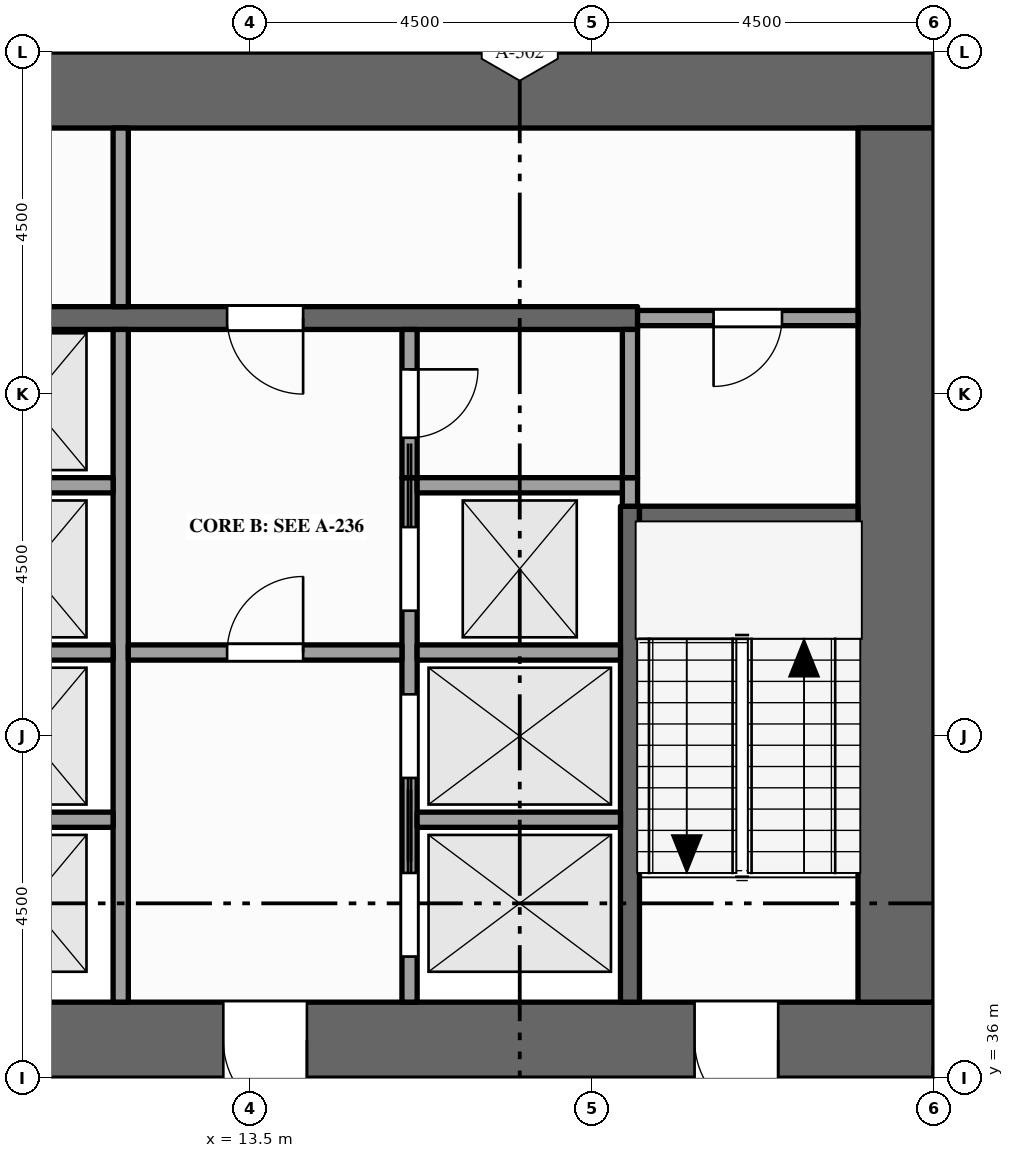
"""IFC4 building model, lengths in metres.
Left out: names, types, materials, properties, quantities, classifications, styles, units other than length and angle.
Written with IfcOpenShell. Run it as: python <this file> out.ifc"""

import sys

from ifc_helpers import new_model, si_unit, direction, frame, frame_2d, origin, place, context, subcontext, project, spatial, rectangle, extrude, element, fill, save


model = new_model("IFC4")
c1 = context("Model", 3, precision=1e-05, world=origin(), true_north=direction((0.0, 1.0)))
c2 = subcontext(c1, "Body", "Model", "MODEL_VIEW")
j1 = project(units=[si_unit("LENGTHUNIT", "METRE"), si_unit("PLANEANGLEUNIT", "RADIAN")], contexts=[c1])
p1 = place(None, origin())
s1 = spatial("IfcSite", under=j1, at=p1, CompositionType="ELEMENT")
p2 = place(p1, origin())
s2 = spatial("IfcBuilding", under=s1, at=p2, CompositionType="ELEMENT")
p3 = place(p2, frame((0.0, 0.0, 199.0)))
s3 = spatial("IfcBuildingStorey", under=s2, at=p3, CompositionType="ELEMENT", Elevation=199.0)
p4 = place(p3, frame((0.0, 36.5, -0.15), z_axis=(0.0, 0.0, 1.0), x_axis=(1.0, 0.0, 0.0)))
e1 = element("IfcWall", 1, at=p4, inside=s3, PredefinedType="SHEAR", context=c2, shape_type="SweptSolid", body=[
    extrude(rectangle(XDim=22.5, YDim=1.0, at=frame_2d((11.25, 0.0))), origin(), (0.0, 0.0, 1.0), 4.0),
])
p5 = place(p4, frame((7.1, 0.0, 0.15)))
e2 = element("IfcOpeningElement", 2, at=p5, cuts=e1, PredefinedType="OPENING", context=c2, shape_type="SweptSolid", body=[
    extrude(rectangle(XDim=1.8, YDim=2.1, at=frame_2d((0.9, 1.05))), frame((0.0, 0.51, 0.0), z_axis=(0.0, -1.0, 0.0), x_axis=(1.0, 0.0, 0.0)), (0.0, 0.0, 1.0), 1.02),
])
p6 = place(p4, frame((13.15, 0.0, 0.15)))
e3 = element("IfcOpeningElement", 3, at=p6, cuts=e1, PredefinedType="OPENING", context=c2, shape_type="SweptSolid", body=[
    extrude(rectangle(XDim=1.1, YDim=2.1, at=frame_2d((0.55, 1.05))), frame((0.0, 0.51, 0.0), z_axis=(0.0, -1.0, 0.0), x_axis=(1.0, 0.0, 0.0)), (0.0, 0.0, 1.0), 1.02),
])
p7 = place(p4, frame((2.15, 0.0, 0.15)))
e4 = element("IfcOpeningElement", 4, at=p7, cuts=e1, PredefinedType="OPENING", context=c2, shape_type="SweptSolid", body=[
    extrude(rectangle(XDim=1.1, YDim=2.1, at=frame_2d((0.55, 1.05))), frame((0.0, 0.51, 0.0), z_axis=(0.0, -1.0, 0.0), x_axis=(1.0, 0.0, 0.0)), (0.0, 0.0, 1.0), 1.02),
])
p8 = place(p4, frame((19.35, 0.0, 0.15)))
e5 = element("IfcOpeningElement", 5, at=p8, cuts=e1, PredefinedType="OPENING", context=c2, shape_type="SweptSolid", body=[
    extrude(rectangle(XDim=1.1, YDim=2.1, at=frame_2d((0.55, 1.05))), frame((0.0, 0.51, 0.0), z_axis=(0.0, -1.0, 0.0), x_axis=(1.0, 0.0, 0.0)), (0.0, 0.0, 1.0), 1.02),
])
p9 = place(p3, frame((0.0, 49.0, -0.15), z_axis=(0.0, 0.0, 1.0), x_axis=(1.0, 0.0, 0.0)))
e6 = element("IfcWall", 6, at=p9, inside=s3, PredefinedType="SHEAR", context=c2, shape_type="SweptSolid", body=[
    extrude(rectangle(XDim=22.5, YDim=1.0, at=frame_2d((11.25, 0.0))), origin(), (0.0, 0.0, 1.0), 4.0),
])
p10 = place(p3, frame((22.0, 37.0, -0.15), z_axis=(0.0, 0.0, 1.0), x_axis=(0.0, 1.0, 0.0)))
e7 = element("IfcWall", 7, at=p10, inside=s3, PredefinedType="SHEAR", context=c2, shape_type="SweptSolid", body=[
    extrude(rectangle(XDim=11.5, YDim=1.0, at=frame_2d((5.75, 0.0))), origin(), (0.0, 0.0, 1.0), 4.0),
])
p11 = place(p3, frame((11.8, 37.0, 0.0), z_axis=(0.0, 0.0, 1.0), x_axis=(0.0, 1.0, 0.0)))
e8 = element("IfcWall", 8, at=p11, inside=s3, PredefinedType="SOLIDWALL", context=c2, shape_type="SweptSolid", body=[
    extrude(rectangle(XDim=8.85, YDim=0.2, at=frame_2d((4.425, 0.0))), origin(), (0.0, 0.0, 1.0), 3.85),
])
p12 = place(p3, frame((11.8, 46.15, 0.0), z_axis=(0.0, 0.0, 1.0), x_axis=(0.0, 1.0, 0.0)))
e9 = element("IfcWall", 9, at=p12, inside=s3, PredefinedType="PARTITIONING", context=c2, shape_type="SweptSolid", body=[
    extrude(rectangle(XDim=2.35, YDim=0.2, at=frame_2d((1.175, 0.0))), origin(), (0.0, 0.0, 1.0), 3.85),
])
p13 = place(p3, frame((15.6, 37.0, 0.0), z_axis=(0.0, 0.0, 1.0), x_axis=(0.0, 1.0, 0.0)))
e10 = element("IfcWall", 10, at=p13, inside=s3, PredefinedType="SOLIDWALL", context=c2, shape_type="SweptSolid", body=[
    extrude(rectangle(XDim=6.9, YDim=0.2, at=frame_2d((3.45, 0.0))), origin(), (0.0, 0.0, 1.0), 3.85),
])
p14 = place(p13, frame((0.6, 0.0, 0.012)))
e11 = element("IfcOpeningElement", 11, at=p14, cuts=e10, PredefinedType="OPENING", context=c2, shape_type="SweptSolid", body=[
    extrude(rectangle(XDim=1.1, YDim=2.1, at=frame_2d((0.55, 1.05))), frame((0.0, 0.11, 0.0), z_axis=(0.0, -1.0, 0.0), x_axis=(1.0, 0.0, 0.0)), (0.0, 0.0, 1.0), 0.22),
])
p15 = place(p13, frame((2.95, 0.0, 0.012)))
e12 = element("IfcOpeningElement", 12, at=p15, cuts=e10, PredefinedType="OPENING", context=c2, shape_type="SweptSolid", body=[
    extrude(rectangle(XDim=1.1, YDim=2.1, at=frame_2d((0.55, 1.05))), frame((0.0, 0.11, 0.0), z_axis=(0.0, -1.0, 0.0), x_axis=(1.0, 0.0, 0.0)), (0.0, 0.0, 1.0), 0.22),
])
p16 = place(p13, frame((5.15, 0.0, 0.012)))
e13 = element("IfcOpeningElement", 13, at=p16, cuts=e10, PredefinedType="OPENING", context=c2, shape_type="SweptSolid", body=[
    extrude(rectangle(XDim=1.1, YDim=2.1, at=frame_2d((0.55, 1.05))), frame((0.0, 0.11, 0.0), z_axis=(0.0, -1.0, 0.0), x_axis=(1.0, 0.0, 0.0)), (0.0, 0.0, 1.0), 0.22),
])
p17 = place(p3, frame((15.6, 43.9, 0.0), z_axis=(0.0, 0.0, 1.0), x_axis=(0.0, 1.0, 0.0)))
e14 = element("IfcWall", 14, at=p17, inside=s3, PredefinedType="PARTITIONING", context=c2, shape_type="SweptSolid", body=[
    extrude(rectangle(XDim=1.95, YDim=0.2, at=frame_2d((0.975, 0.0))), origin(), (0.0, 0.0, 1.0), 3.85),
])
p18 = place(p17, frame((0.525, 0.0, 0.0)))
e15 = element("IfcOpeningElement", 15, at=p18, cuts=e14, PredefinedType="OPENING", context=c2, shape_type="SweptSolid", body=[
    extrude(rectangle(XDim=0.9, YDim=2.1, at=frame_2d((0.45, 1.05))), frame((0.0, 0.11, 0.0), z_axis=(0.0, -1.0, 0.0), x_axis=(1.0, 0.0, 0.0)), (0.0, 0.0, 1.0), 0.22),
])
p19 = place(p3, frame((18.5, 37.0, 0.0), z_axis=(0.0, 0.0, 1.0), x_axis=(0.0, 1.0, 0.0)))
e16 = element("IfcWall", 16, at=p19, inside=s3, PredefinedType="SHEAR", context=c2, shape_type="SweptSolid", body=[
    extrude(rectangle(XDim=6.525, YDim=0.25, at=frame_2d((3.262, 0.0))), origin(), (0.0, 0.0, 1.0), 3.85),
])
p20 = place(p3, frame((18.5, 43.525, 0.0), z_axis=(0.0, 0.0, 1.0), x_axis=(0.0, 1.0, 0.0)))
e17 = element("IfcWall", 17, at=p20, inside=s3, PredefinedType="SOLIDWALL", context=c2, shape_type="SweptSolid", body=[
    extrude(rectangle(XDim=0.375, YDim=0.2, at=frame_2d((0.188, 0.0))), origin(), (0.0, 0.0, 1.0), 3.85),
])
p21 = place(p3, frame((18.5, 43.9, 0.0), z_axis=(0.0, 0.0, 1.0), x_axis=(0.0, 1.0, 0.0)))
e18 = element("IfcWall", 18, at=p21, inside=s3, PredefinedType="PARTITIONING", context=c2, shape_type="SweptSolid", body=[
    extrude(rectangle(XDim=1.95, YDim=0.2, at=frame_2d((0.975, 0.0))), origin(), (0.0, 0.0, 1.0), 3.85),
])
p22 = place(p3, frame((9.5, 39.4, 0.0), z_axis=(0.0, 0.0, 1.0), x_axis=(1.0, 0.0, 0.0)))
e19 = element("IfcWall", 19, at=p22, inside=s3, PredefinedType="SOLIDWALL", context=c2, shape_type="SweptSolid", body=[
    extrude(rectangle(XDim=2.2, YDim=0.2, at=frame_2d((1.1, 0.0))), origin(), (0.0, 0.0, 1.0), 3.85),
])
p23 = place(p3, frame((15.7, 39.4, 0.0), z_axis=(0.0, 0.0, 1.0), x_axis=(1.0, 0.0, 0.0)))
e20 = element("IfcWall", 20, at=p23, inside=s3, PredefinedType="SOLIDWALL", context=c2, shape_type="SweptSolid", body=[
    extrude(rectangle(XDim=2.675, YDim=0.2, at=frame_2d((1.337, 0.0))), origin(), (0.0, 0.0, 1.0), 3.85),
])
p24 = place(p3, frame((9.5, 41.6, 0.0), z_axis=(0.0, 0.0, 1.0), x_axis=(1.0, 0.0, 0.0)))
e21 = element("IfcWall", 21, at=p24, inside=s3, PredefinedType="SOLIDWALL", context=c2, shape_type="SweptSolid", body=[
    extrude(rectangle(XDim=2.2, YDim=0.2, at=frame_2d((1.1, 0.0))), origin(), (0.0, 0.0, 1.0), 3.85),
])
p25 = place(p3, frame((11.9, 41.6, 0.0), z_axis=(0.0, 0.0, 1.0), x_axis=(1.0, 0.0, 0.0)))
e22 = element("IfcWall", 22, at=p25, inside=s3, PredefinedType="PARTITIONING", context=c2, shape_type="SweptSolid", body=[
    extrude(rectangle(XDim=3.6, YDim=0.2, at=frame_2d((1.8, 0.0))), origin(), (0.0, 0.0, 1.0), 3.85),
])
p26 = place(p25, frame((1.3, 0.0, 0.0)))
e23 = element("IfcOpeningElement", 23, at=p26, cuts=e22, PredefinedType="OPENING", context=c2, shape_type="SweptSolid", body=[
    extrude(rectangle(XDim=1.0, YDim=2.1, at=frame_2d((0.5, 1.05))), frame((0.0, 0.11, 0.0), z_axis=(0.0, -1.0, 0.0), x_axis=(1.0, 0.0, 0.0)), (0.0, 0.0, 1.0), 0.22),
])
p27 = place(p3, frame((15.7, 41.6, 0.0), z_axis=(0.0, 0.0, 1.0), x_axis=(1.0, 0.0, 0.0)))
e24 = element("IfcWall", 24, at=p27, inside=s3, PredefinedType="SOLIDWALL", context=c2, shape_type="SweptSolid", body=[
    extrude(rectangle(XDim=2.675, YDim=0.2, at=frame_2d((1.337, 0.0))), origin(), (0.0, 0.0, 1.0), 3.85),
])
p28 = place(p3, frame((18.625, 43.4, 0.0), z_axis=(0.0, 0.0, 1.0), x_axis=(1.0, 0.0, 0.0)))
e25 = element("IfcWall", 25, at=p28, inside=s3, PredefinedType="SHEAR", context=c2, shape_type="SweptSolid", body=[
    extrude(rectangle(XDim=2.875, YDim=0.25, at=frame_2d((1.438, 0.0))), origin(), (0.0, 0.0, 1.0), 3.85),
])
p29 = place(p3, frame((9.5, 43.8, 0.0), z_axis=(0.0, 0.0, 1.0), x_axis=(1.0, 0.0, 0.0)))
e26 = element("IfcWall", 26, at=p29, inside=s3, PredefinedType="SOLIDWALL", context=c2, shape_type="SweptSolid", body=[
    extrude(rectangle(XDim=2.2, YDim=0.2, at=frame_2d((1.1, 0.0))), origin(), (0.0, 0.0, 1.0), 3.85),
])
p30 = place(p3, frame((15.7, 43.8, 0.0), z_axis=(0.0, 0.0, 1.0), x_axis=(1.0, 0.0, 0.0)))
e27 = element("IfcWall", 27, at=p30, inside=s3, PredefinedType="SOLIDWALL", context=c2, shape_type="SweptSolid", body=[
    extrude(rectangle(XDim=2.7, YDim=0.2, at=frame_2d((1.35, 0.0))), origin(), (0.0, 0.0, 1.0), 3.85),
])
p31 = place(p3, frame((4.1, 46.0, 0.0), z_axis=(0.0, 0.0, 1.0), x_axis=(1.0, 0.0, 0.0)))
e28 = element("IfcWall", 28, at=p31, inside=s3, PredefinedType="SHEAR", context=c2, shape_type="SweptSolid", body=[
    extrude(rectangle(XDim=14.5, YDim=0.3, at=frame_2d((7.25, 0.0))), origin(), (0.0, 0.0, 1.0), 3.85),
])
p32 = place(p31, frame((3.4, 0.0, 0.0)))
e29 = element("IfcOpeningElement", 29, at=p32, cuts=e28, PredefinedType="OPENING", context=c2, shape_type="SweptSolid", body=[
    extrude(rectangle(XDim=1.0, YDim=2.1, at=frame_2d((0.5, 1.05))), frame((0.0, 0.16, 0.0), z_axis=(0.0, -1.0, 0.0), x_axis=(1.0, 0.0, 0.0)), (0.0, 0.0, 1.0), 0.32),
])
p33 = place(p31, frame((9.1, 0.0, 0.0)))
e30 = element("IfcOpeningElement", 30, at=p33, cuts=e28, PredefinedType="OPENING", context=c2, shape_type="SweptSolid", body=[
    extrude(rectangle(XDim=1.0, YDim=2.1, at=frame_2d((0.5, 1.05))), frame((0.0, 0.16, 0.0), z_axis=(0.0, -1.0, 0.0), x_axis=(1.0, 0.0, 0.0)), (0.0, 0.0, 1.0), 0.32),
])
p34 = place(p3, frame((18.6, 46.0, 0.0), z_axis=(0.0, 0.0, 1.0), x_axis=(1.0, 0.0, 0.0)))
e31 = element("IfcWall", 31, at=p34, inside=s3, PredefinedType="PARTITIONING", context=c2, shape_type="SweptSolid", body=[
    extrude(rectangle(XDim=2.9, YDim=0.2, at=frame_2d((1.45, 0.0))), origin(), (0.0, 0.0, 1.0), 3.85),
])
p35 = place(p34, frame((1.0, 0.0, 0.0)))
e32 = element("IfcOpeningElement", 32, at=p35, cuts=e31, PredefinedType="OPENING", context=c2, shape_type="SweptSolid", body=[
    extrude(rectangle(XDim=0.9, YDim=2.1, at=frame_2d((0.45, 1.05))), frame((0.0, 0.11, 0.0), z_axis=(0.0, -1.0, 0.0), x_axis=(1.0, 0.0, 0.0)), (0.0, 0.0, 1.0), 0.22),
])
p36 = place(p14, origin())
e33 = element("IfcDoor", 33, at=p36, inside=s3, OperationType="SLIDING_TO_RIGHT", PredefinedType="DOOR", context=c2, shape_type="SweptSolid", body=[
    extrude(rectangle(XDim=1.1, YDim=2.1, at=frame_2d((0.55, 1.05))), frame((0.0, 0.025, 0.0), z_axis=(0.0, -1.0, 0.0), x_axis=(1.0, 0.0, 0.0)), (0.0, 0.0, 1.0), 0.05),
])
fill(e11, e33)
p37 = place(p15, origin())
e34 = element("IfcDoor", 34, at=p37, inside=s3, OperationType="SLIDING_TO_LEFT", PredefinedType="DOOR", context=c2, shape_type="SweptSolid", body=[
    extrude(rectangle(XDim=1.1, YDim=2.1, at=frame_2d((0.55, 1.05))), frame((0.0, 0.025, 0.0), z_axis=(0.0, -1.0, 0.0), x_axis=(1.0, 0.0, 0.0)), (0.0, 0.0, 1.0), 0.05),
])
fill(e12, e34)
p38 = place(p16, origin())
e35 = element("IfcDoor", 35, at=p38, inside=s3, OperationType="SLIDING_TO_RIGHT", PredefinedType="DOOR", context=c2, shape_type="SweptSolid", body=[
    extrude(rectangle(XDim=1.1, YDim=2.1, at=frame_2d((0.55, 1.05))), frame((0.0, 0.025, 0.0), z_axis=(0.0, -1.0, 0.0), x_axis=(1.0, 0.0, 0.0)), (0.0, 0.0, 1.0), 0.05),
])
fill(e13, e35)
p39 = place(p6, origin())
e36 = element("IfcDoor", 36, at=p39, inside=s3, OperationType="SINGLE_SWING_RIGHT", PredefinedType="DOOR", context=c2, shape_type="SweptSolid", body=[
    extrude(rectangle(XDim=1.1, YDim=2.1, at=frame_2d((0.55, 1.05))), frame((0.0, 0.025, 0.0), z_axis=(0.0, -1.0, 0.0), x_axis=(1.0, 0.0, 0.0)), (0.0, 0.0, 1.0), 0.05),
])
fill(e3, e36)
p40 = place(p26, origin())
e37 = element("IfcDoor", 37, at=p40, inside=s3, OperationType="SINGLE_SWING_RIGHT", PredefinedType="DOOR", context=c2, shape_type="SweptSolid", body=[
    extrude(rectangle(XDim=1.0, YDim=2.1, at=frame_2d((0.5, 1.05))), frame((0.0, 0.025, 0.0), z_axis=(0.0, -1.0, 0.0), x_axis=(1.0, 0.0, 0.0)), (0.0, 0.0, 1.0), 0.05),
])
fill(e23, e37)
p41 = place(p33, origin())
e38 = element("IfcDoor", 38, at=p41, inside=s3, OperationType="SINGLE_SWING_RIGHT", PredefinedType="DOOR", context=c2, shape_type="SweptSolid", body=[
    extrude(rectangle(XDim=1.0, YDim=2.1, at=frame_2d((0.5, 1.05))), frame((0.0, 0.025, 0.0), z_axis=(0.0, -1.0, 0.0), x_axis=(1.0, 0.0, 0.0)), (0.0, 0.0, 1.0), 0.05),
])
fill(e30, e38)
p42 = place(p8, origin())
e39 = element("IfcDoor", 39, at=p42, inside=s3, OperationType="SINGLE_SWING_RIGHT", PredefinedType="DOOR", context=c2, shape_type="SweptSolid", body=[
    extrude(rectangle(XDim=1.1, YDim=2.1, at=frame_2d((0.55, 1.05))), frame((0.0, 0.025, 0.0), z_axis=(0.0, -1.0, 0.0), x_axis=(1.0, 0.0, 0.0)), (0.0, 0.0, 1.0), 0.05),
])
fill(e5, e39)
p43 = place(p35, origin())
e40 = element("IfcDoor", 40, at=p43, inside=s3, OperationType="SINGLE_SWING_LEFT", PredefinedType="DOOR", context=c2, shape_type="SweptSolid", body=[
    extrude(rectangle(XDim=0.9, YDim=2.1, at=frame_2d((0.45, 1.05))), frame((0.0, 0.025, 0.0), z_axis=(0.0, -1.0, 0.0), x_axis=(1.0, 0.0, 0.0)), (0.0, 0.0, 1.0), 0.05),
])
fill(e32, e40)
p44 = place(p18, origin())
e41 = element("IfcDoor", 41, at=p44, inside=s3, OperationType="SINGLE_SWING_RIGHT", PredefinedType="DOOR", context=c2, shape_type="SweptSolid", body=[
    extrude(rectangle(XDim=0.9, YDim=2.1, at=frame_2d((0.45, 1.05))), frame((0.0, 0.025, 0.0), z_axis=(0.0, -1.0, 0.0), x_axis=(1.0, 0.0, 0.0)), (0.0, 0.0, 1.0), 0.05),
])
fill(e15, e41)
save(model, sys.argv[1])
